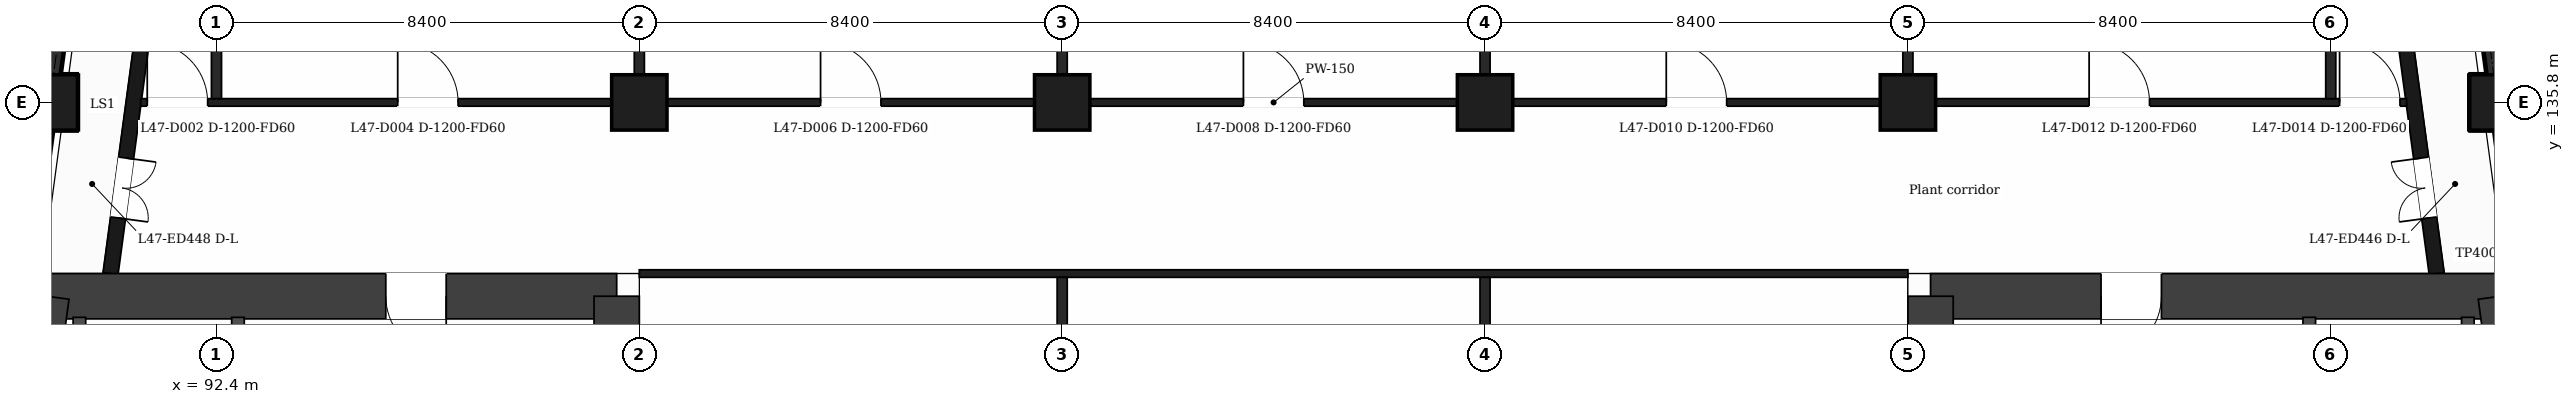
"""IFC4 building model, lengths in metres.
Left out: names, types, materials, properties, quantities, classifications, styles, units other than length and angle.
Written with IfcOpenShell. Run it as: python <this file> out.ifc"""

import sys

from ifc_helpers import new_model, si_unit, direction, frame, frame_2d, origin, origin_2d, place, context, subcontext, project, spatial, rectangle, extrude, element, fill, save


model = new_model("IFC4")
c1 = context("Model", 3, precision=1e-05, world=origin(), true_north=direction((0.0, 1.0)))
c2 = subcontext(c1, "Body", "Model", "MODEL_VIEW")
j1 = project(units=[si_unit("LENGTHUNIT", "METRE"), si_unit("PLANEANGLEUNIT", "RADIAN")], contexts=[c1])
p1 = place(None, origin())
s1 = spatial("IfcSite", under=j1, at=p1, CompositionType="ELEMENT")
p2 = place(p1, origin())
s2 = spatial("IfcBuilding", under=s1, at=p2, CompositionType="ELEMENT")
p3 = place(p2, frame((0.0, 0.0, 197.2)))
s3 = spatial("IfcBuildingStorey", under=s2, at=p3, CompositionType="ELEMENT", Elevation=197.2)
p4 = place(p3, frame((89.024, 131.95, 0.0), z_axis=(0.0, 0.0, 1.0), x_axis=(1.0, 0.0, 0.0)))
e1 = element("IfcWall", 1, at=p4, inside=s3, PredefinedType="SHEAR", context=c2, shape_type="SweptSolid", body=[
    extrude(rectangle(XDim=11.326, YDim=0.9, at=frame_2d((5.663, 0.0))), origin(), (0.0, 0.0, 1.0), 5.0),
])
p5 = place(p4, frame((6.739, 0.0, 0.0)))
e2 = element("IfcOpeningElement", 2, at=p5, cuts=e1, PredefinedType="OPENING", context=c2, shape_type="SweptSolid", body=[
    extrude(rectangle(XDim=1.2, YDim=2.1, at=frame_2d((0.6, 1.05))), frame((0.0, 0.46, 0.0), z_axis=(0.0, -1.0, 0.0), x_axis=(1.0, 0.0, 0.0)), (0.0, 0.0, 1.0), 0.92),
])
p6 = place(p3, frame((100.35, 131.95, 0.0), z_axis=(0.0, 0.0, 1.0), x_axis=(0.0, -1.0, 0.0)))
e3 = element("IfcWall", 3, at=p6, inside=s3, PredefinedType="SHEAR", context=c2, shape_type="SweptSolid", body=[
    extrude(rectangle(XDim=21.1, YDim=0.9, at=frame_2d((10.55, 0.0))), origin(), (0.0, 0.0, 1.0), 5.0),
])
p7 = place(p6, frame((2.35, 0.0, 0.0)))
e4 = element("IfcOpeningElement", 4, at=p7, cuts=e3, PredefinedType="OPENING", context=c2, shape_type="SweptSolid", body=[
    extrude(rectangle(XDim=1.2, YDim=2.1, at=frame_2d((0.6, 1.05))), frame((0.0, 0.46, 0.0), z_axis=(0.0, -1.0, 0.0), x_axis=(1.0, 0.0, 0.0)), (0.0, 0.0, 1.0), 0.92),
])
p8 = place(p6, frame((7.8, 0.0, 0.0)))
e5 = element("IfcOpeningElement", 5, at=p8, cuts=e3, PredefinedType="OPENING", context=c2, shape_type="SweptSolid", body=[
    extrude(rectangle(XDim=1.4, YDim=2.1, at=frame_2d((0.7, 1.05))), frame((0.0, 0.46, 0.0), z_axis=(0.0, -1.0, 0.0), x_axis=(1.0, 0.0, 0.0)), (0.0, 0.0, 1.0), 0.92),
])
p9 = place(p3, frame((86.184, 110.85, 0.0), z_axis=(0.0, 0.0, 1.0), x_axis=(0.133410495943, 0.991060865725, 0.0)))
e6 = element("IfcWall", 6, at=p9, inside=s3, PredefinedType="SHEAR", context=c2, shape_type="SweptSolid", body=[
    extrude(rectangle(XDim=21.29, YDim=0.9, at=frame_2d((10.645, 0.0))), origin(), (0.0, 0.0, 1.0), 5.0),
])
p10 = place(p3, frame((126.45, 131.95, 0.0), z_axis=(0.0, 0.0, 1.0), x_axis=(1.0, 0.0, 0.0)))
e7 = element("IfcWall", 7, at=p10, inside=s3, PredefinedType="SHEAR", context=c2, shape_type="SweptSolid", body=[
    extrude(rectangle(XDim=11.326, YDim=0.9, at=frame_2d((5.663, 0.0))), origin(), (0.0, 0.0, 1.0), 5.0),
])
p11 = place(p10, frame((3.386, 0.0, 0.0)))
e8 = element("IfcOpeningElement", 8, at=p11, cuts=e7, PredefinedType="OPENING", context=c2, shape_type="SweptSolid", body=[
    extrude(rectangle(XDim=1.2, YDim=2.1, at=frame_2d((0.6, 1.05))), frame((0.0, 0.46, 0.0), z_axis=(0.0, -1.0, 0.0), x_axis=(1.0, 0.0, 0.0)), (0.0, 0.0, 1.0), 0.92),
])
p12 = place(p3, frame((137.776, 131.95, 0.0), z_axis=(0.0, 0.0, 1.0), x_axis=(0.133421759112, -0.991059349482, 0.0)))
e9 = element("IfcWall", 9, at=p12, inside=s3, PredefinedType="SHEAR", context=c2, shape_type="SweptSolid", body=[
    extrude(rectangle(XDim=21.29, YDim=0.9, at=frame_2d((10.645, 0.0))), origin(), (0.0, 0.0, 1.0), 5.0),
])
p13 = place(p3, frame((126.45, 110.85, 0.0), z_axis=(0.0, 0.0, 1.0), x_axis=(0.0, 1.0, 0.0)))
e10 = element("IfcWall", 10, at=p13, inside=s3, PredefinedType="SHEAR", context=c2, shape_type="SweptSolid", body=[
    extrude(rectangle(XDim=21.1, YDim=0.9, at=frame_2d((10.55, 0.0))), origin(), (0.0, 0.0, 1.0), 5.0),
])
p14 = place(p13, frame((1.05, 0.0, 0.0)))
e11 = element("IfcOpeningElement", 11, at=p14, cuts=e10, PredefinedType="OPENING", context=c2, shape_type="SweptSolid", body=[
    extrude(rectangle(XDim=1.2, YDim=2.1, at=frame_2d((0.6, 1.05))), frame((0.0, 0.46, 0.0), z_axis=(0.0, -1.0, 0.0), x_axis=(1.0, 0.0, 0.0)), (0.0, 0.0, 1.0), 0.92),
])
p15 = place(p13, frame((11.9, 0.0, 0.0)))
e12 = element("IfcOpeningElement", 12, at=p15, cuts=e10, PredefinedType="OPENING", context=c2, shape_type="SweptSolid", body=[
    extrude(rectangle(XDim=1.4, YDim=2.1, at=frame_2d((0.7, 1.05))), frame((0.0, 0.46, 0.0), z_axis=(0.0, -1.0, 0.0), x_axis=(1.0, 0.0, 0.0)), (0.0, 0.0, 1.0), 0.92),
])
for number, where, z_axis, x_axis in (
    (13, (100.8, 135.8, 0.0), (0.0, 0.0, 1.0), (1.0, 0.0, 0.0)),
    (14, (109.2, 135.8, 0.0), (0.0, 0.0, 1.0), (1.0, 0.0, 0.0)),
    (15, (117.6, 135.8, 0.0), (0.0, 0.0, 1.0), (1.0, 0.0, 0.0)),
    (16, (126.0, 135.8, 0.0), (0.0, 0.0, 1.0), (1.0, 0.0, 0.0)),
    (17, (89.088, 135.8, 0.0), (0.0, 0.0, 1.0), (1.0, 0.0, 0.0)),
    (18, (137.711, 135.8, 0.0), (0.0, 0.0, 1.0), (1.0, 0.0, 0.0)),
):
    element("IfcColumn", number, at=place(p3, frame(where, z_axis=z_axis, x_axis=x_axis)), inside=s3, PredefinedType="COLUMN", context=c2, shape_type="SweptSolid", body=[
        extrude(rectangle(XDim=1.1, YDim=1.1, at=origin_2d()), origin(), (0.0, 0.0, 1.0), 5.0),
    ])
p16 = place(p3, frame((136.504, 132.4, 0.0), z_axis=(0.0, 0.0, 1.0), x_axis=(-0.133399697462, 0.99106231929, 0.0)))
e19 = element("IfcWall", 19, at=p16, inside=s3, PredefinedType="SOLIDWALL", context=c2, shape_type="SweptSolid", body=[
    extrude(rectangle(XDim=6.74, YDim=0.3, at=frame_2d((3.37, 0.0))), origin(), (0.0, 0.0, 1.0), 4.68),
])
p17 = place(p16, frame((1.115, 0.0, 0.0)))
e20 = element("IfcOpeningElement", 20, at=p17, cuts=e19, PredefinedType="OPENING", context=c2, shape_type="SweptSolid", body=[
    extrude(rectangle(XDim=1.2, YDim=2.4, at=frame_2d((0.6, 1.2))), frame((0.0, 0.16, 0.0), z_axis=(0.0, -1.0, 0.0), x_axis=(1.0, 0.0, 0.0)), (0.0, 0.0, 1.0), 0.32),
])
p18 = place(p3, frame((91.177, 138.95, 0.0), z_axis=(0.0, 0.0, 1.0), x_axis=(-0.133426664613, -0.991058689065, 0.0)))
e21 = element("IfcWall", 21, at=p18, inside=s3, PredefinedType="SOLIDWALL", context=c2, shape_type="SweptSolid", body=[
    extrude(rectangle(XDim=6.609, YDim=0.3, at=frame_2d((3.305, 0.0))), origin(), (0.0, 0.0, 1.0), 4.68),
])
p19 = place(p18, frame((4.294, 0.0, 0.0)))
e22 = element("IfcOpeningElement", 22, at=p19, cuts=e21, PredefinedType="OPENING", context=c2, shape_type="SweptSolid", body=[
    extrude(rectangle(XDim=1.2, YDim=2.4, at=frame_2d((0.6, 1.2))), frame((0.0, 0.16, 0.0), z_axis=(0.0, -1.0, 0.0), x_axis=(1.0, 0.0, 0.0)), (0.0, 0.0, 1.0), 0.32),
])
p20 = place(p3, frame((100.8, 132.4, 0.0), z_axis=(0.0, 0.0, 1.0), x_axis=(1.0, 0.0, 0.0)))
e23 = element("IfcWall", 23, at=p20, inside=s3, PredefinedType="PARTITIONING", context=c2, shape_type="SweptSolid", body=[
    extrude(rectangle(XDim=25.2, YDim=0.15, at=frame_2d((12.6, 0.0))), origin(), (0.0, 0.0, 1.0), 4.68),
])
p21 = place(p3, frame((90.895, 135.8, 0.0), z_axis=(0.0, 0.0, 1.0), x_axis=(1.0, 0.0, 0.0)))
e24 = element("IfcWall", 24, at=p21, inside=s3, PredefinedType="PARTITIONING", context=c2, shape_type="SweptSolid", body=[
    extrude(rectangle(XDim=45.011, YDim=0.15, at=frame_2d((22.505, 0.0))), origin(), (0.0, 0.0, 1.0), 4.68),
])
p22 = place(p21, frame((0.13, 0.0, 0.0)))
e25 = element("IfcOpeningElement", 25, at=p22, cuts=e24, PredefinedType="OPENING", context=c2, shape_type="SweptSolid", body=[
    extrude(rectangle(XDim=1.2, YDim=2.1, at=frame_2d((0.6, 1.05))), frame((0.0, 0.085, 0.0), z_axis=(0.0, -1.0, 0.0), x_axis=(1.0, 0.0, 0.0)), (0.0, 0.0, 1.0), 0.17),
])
p23 = place(p21, frame((5.105, 0.0, 0.0)))
e26 = element("IfcOpeningElement", 26, at=p23, cuts=e24, PredefinedType="OPENING", context=c2, shape_type="SweptSolid", body=[
    extrude(rectangle(XDim=1.2, YDim=2.1, at=frame_2d((0.6, 1.05))), frame((0.0, 0.085, 0.0), z_axis=(0.0, -1.0, 0.0), x_axis=(1.0, 0.0, 0.0)), (0.0, 0.0, 1.0), 0.17),
])
p24 = place(p21, frame((13.505, 0.0, 0.0)))
e27 = element("IfcOpeningElement", 27, at=p24, cuts=e24, PredefinedType="OPENING", context=c2, shape_type="SweptSolid", body=[
    extrude(rectangle(XDim=1.2, YDim=2.1, at=frame_2d((0.6, 1.05))), frame((0.0, 0.085, 0.0), z_axis=(0.0, -1.0, 0.0), x_axis=(1.0, 0.0, 0.0)), (0.0, 0.0, 1.0), 0.17),
])
p25 = place(p21, frame((21.906, 0.0, 0.0)))
e28 = element("IfcOpeningElement", 28, at=p25, cuts=e24, PredefinedType="OPENING", context=c2, shape_type="SweptSolid", body=[
    extrude(rectangle(XDim=1.2, YDim=2.1, at=frame_2d((0.6, 1.05))), frame((0.0, 0.085, 0.0), z_axis=(0.0, -1.0, 0.0), x_axis=(1.0, 0.0, 0.0)), (0.0, 0.0, 1.0), 0.17),
])
p26 = place(p21, frame((30.305, 0.0, 0.0)))
e29 = element("IfcOpeningElement", 29, at=p26, cuts=e24, PredefinedType="OPENING", context=c2, shape_type="SweptSolid", body=[
    extrude(rectangle(XDim=1.2, YDim=2.1, at=frame_2d((0.6, 1.05))), frame((0.0, 0.085, 0.0), z_axis=(0.0, -1.0, 0.0), x_axis=(1.0, 0.0, 0.0)), (0.0, 0.0, 1.0), 0.17),
])
p27 = place(p21, frame((38.705, 0.0, 0.0)))
e30 = element("IfcOpeningElement", 30, at=p27, cuts=e24, PredefinedType="OPENING", context=c2, shape_type="SweptSolid", body=[
    extrude(rectangle(XDim=1.2, YDim=2.1, at=frame_2d((0.6, 1.05))), frame((0.0, 0.085, 0.0), z_axis=(0.0, -1.0, 0.0), x_axis=(1.0, 0.0, 0.0)), (0.0, 0.0, 1.0), 0.17),
])
p28 = place(p21, frame((43.681, 0.0, 0.0)))
e31 = element("IfcOpeningElement", 31, at=p28, cuts=e24, PredefinedType="OPENING", context=c2, shape_type="SweptSolid", body=[
    extrude(rectangle(XDim=1.2, YDim=2.1, at=frame_2d((0.6, 1.05))), frame((0.0, 0.085, 0.0), z_axis=(0.0, -1.0, 0.0), x_axis=(1.0, 0.0, 0.0)), (0.0, 0.0, 1.0), 0.17),
])
p29 = place(p3, frame((89.677, 124.575, 0.0), z_axis=(0.0, 0.0, 1.0), x_axis=(0.0, 1.0, 0.0)))
e32 = element("IfcWall", 32, at=p29, inside=s3, PredefinedType="PARTITIONING", context=c2, shape_type="SweptSolid", body=[
    extrude(rectangle(XDim=6.955, YDim=0.25, at=frame_2d((3.478, 0.0))), origin(), (0.0, 0.0, 1.0), 4.68),
])
p30 = place(p3, frame((92.4, 135.875, 0.0), z_axis=(0.0, 0.0, 1.0), x_axis=(0.0, 1.0, 0.0)))
e33 = element("IfcWall", 33, at=p30, inside=s3, PredefinedType="PARTITIONING", context=c2, shape_type="SweptSolid", body=[
    extrude(rectangle(XDim=2.935, YDim=0.2, at=frame_2d((1.468, 0.0))), origin(), (0.0, 0.0, 1.0), 4.68),
])
p31 = place(p3, frame((92.827, 124.575, 0.0), z_axis=(0.0, 0.0, 1.0), x_axis=(0.0, 1.0, 0.0)))
e34 = element("IfcWall", 34, at=p31, inside=s3, PredefinedType="PARTITIONING", context=c2, shape_type="SweptSolid", body=[
    extrude(rectangle(XDim=6.955, YDim=0.25, at=frame_2d((3.478, 0.0))), origin(), (0.0, 0.0, 1.0), 4.68),
])
p32 = place(p31, frame((5.325, 0.0, 0.0)))
e35 = element("IfcOpeningElement", 35, at=p32, cuts=e34, PredefinedType="OPENING", context=c2, shape_type="SweptSolid", body=[
    extrude(rectangle(XDim=1.0, YDim=2.1, at=frame_2d((0.5, 1.05))), frame((0.0, 0.135, 0.0), z_axis=(0.0, -1.0, 0.0), x_axis=(1.0, 0.0, 0.0)), (0.0, 0.0, 1.0), 0.27),
])
p33 = place(p3, frame((100.8, 135.875, 0.0), z_axis=(0.0, 0.0, 1.0), x_axis=(0.0, 1.0, 0.0)))
e36 = element("IfcWall", 36, at=p33, inside=s3, PredefinedType="PARTITIONING", context=c2, shape_type="SweptSolid", body=[
    extrude(rectangle(XDim=7.135, YDim=0.2, at=frame_2d((3.567, 0.0))), origin(), (0.0, 0.0, 1.0), 4.68),
])
p34 = place(p3, frame((109.2, 124.875, 0.0), z_axis=(0.0, 0.0, 1.0), x_axis=(0.0, 1.0, 0.0)))
e37 = element("IfcWall", 37, at=p34, inside=s3, PredefinedType="PARTITIONING", context=c2, shape_type="SweptSolid", body=[
    extrude(rectangle(XDim=7.45, YDim=0.2, at=frame_2d((3.725, 0.0))), origin(), (0.0, 0.0, 1.0), 4.68),
])
p35 = place(p3, frame((109.2, 135.875, 0.0), z_axis=(0.0, 0.0, 1.0), x_axis=(0.0, 1.0, 0.0)))
e38 = element("IfcWall", 38, at=p35, inside=s3, PredefinedType="PARTITIONING", context=c2, shape_type="SweptSolid", body=[
    extrude(rectangle(XDim=7.135, YDim=0.2, at=frame_2d((3.567, 0.0))), origin(), (0.0, 0.0, 1.0), 4.68),
])
p36 = place(p3, frame((117.6, 124.875, 0.0), z_axis=(0.0, 0.0, 1.0), x_axis=(0.0, 1.0, 0.0)))
e39 = element("IfcWall", 39, at=p36, inside=s3, PredefinedType="PARTITIONING", context=c2, shape_type="SweptSolid", body=[
    extrude(rectangle(XDim=7.45, YDim=0.2, at=frame_2d((3.725, 0.0))), origin(), (0.0, 0.0, 1.0), 4.68),
])
for number, where, z_axis, x_axis in (
    (40, (117.6, 135.875, 0.0), (0.0, 0.0, 1.0), (0.0, 1.0, 0.0)),
    (41, (126.0, 135.875, 0.0), (0.0, 0.0, 1.0), (0.0, 1.0, 0.0)),
):
    element("IfcWall", number, at=place(p3, frame(where, z_axis=z_axis, x_axis=x_axis)), inside=s3, PredefinedType="PARTITIONING", context=c2, shape_type="SweptSolid", body=[
        extrude(rectangle(XDim=7.135, YDim=0.2, at=frame_2d((3.567, 0.0))), origin(), (0.0, 0.0, 1.0), 4.68),
    ])
p37 = place(p3, frame((133.973, 124.575, 0.0), z_axis=(0.0, 0.0, 1.0), x_axis=(0.0, 1.0, 0.0)))
e42 = element("IfcWall", 42, at=p37, inside=s3, PredefinedType="PARTITIONING", context=c2, shape_type="SweptSolid", body=[
    extrude(rectangle(XDim=6.955, YDim=0.25, at=frame_2d((3.478, 0.0))), origin(), (0.0, 0.0, 1.0), 4.68),
])
p38 = place(p37, frame((5.325, 0.0, 0.0)))
e43 = element("IfcOpeningElement", 43, at=p38, cuts=e42, PredefinedType="OPENING", context=c2, shape_type="SweptSolid", body=[
    extrude(rectangle(XDim=1.0, YDim=2.1, at=frame_2d((0.5, 1.05))), frame((0.0, 0.135, 0.0), z_axis=(0.0, -1.0, 0.0), x_axis=(1.0, 0.0, 0.0)), (0.0, 0.0, 1.0), 0.27),
])
p39 = place(p3, frame((134.4, 135.875, 0.0), z_axis=(0.0, 0.0, 1.0), x_axis=(0.0, 1.0, 0.0)))
e44 = element("IfcWall", 44, at=p39, inside=s3, PredefinedType="PARTITIONING", context=c2, shape_type="SweptSolid", body=[
    extrude(rectangle(XDim=2.935, YDim=0.2, at=frame_2d((1.468, 0.0))), origin(), (0.0, 0.0, 1.0), 4.68),
])
p40 = place(p3, frame((137.123, 124.575, 0.0), z_axis=(0.0, 0.0, 1.0), x_axis=(0.0, 1.0, 0.0)))
e45 = element("IfcWall", 45, at=p40, inside=s3, PredefinedType="PARTITIONING", context=c2, shape_type="SweptSolid", body=[
    extrude(rectangle(XDim=6.955, YDim=0.25, at=frame_2d((3.478, 0.0))), origin(), (0.0, 0.0, 1.0), 4.68),
])
p41 = place(p17, origin())
e46 = element("IfcDoor", 46, at=p41, inside=s3, OperationType="DOUBLE_DOOR_SINGLE_SWING", PredefinedType="DOOR", context=c2, shape_type="SweptSolid", body=[
    extrude(rectangle(XDim=1.2, YDim=2.4, at=frame_2d((0.6, 1.2))), frame((0.0, 0.025, 0.0), z_axis=(0.0, -1.0, 0.0), x_axis=(1.0, 0.0, 0.0)), (0.0, 0.0, 1.0), 0.05),
])
fill(e20, e46)
p42 = place(p19, origin())
e47 = element("IfcDoor", 47, at=p42, inside=s3, OperationType="DOUBLE_DOOR_SINGLE_SWING", PredefinedType="DOOR", context=c2, shape_type="SweptSolid", body=[
    extrude(rectangle(XDim=1.2, YDim=2.4, at=frame_2d((0.6, 1.2))), frame((0.0, 0.025, 0.0), z_axis=(0.0, -1.0, 0.0), x_axis=(1.0, 0.0, 0.0)), (0.0, 0.0, 1.0), 0.05),
])
fill(e22, e47)
p43 = place(p22, origin())
e48 = element("IfcDoor", 48, at=p43, inside=s3, OperationType="SINGLE_SWING_LEFT", PredefinedType="DOOR", context=c2, shape_type="SweptSolid", body=[
    extrude(rectangle(XDim=1.2, YDim=2.1, at=frame_2d((0.6, 1.05))), frame((0.0, 0.025, 0.0), z_axis=(0.0, -1.0, 0.0), x_axis=(1.0, 0.0, 0.0)), (0.0, 0.0, 1.0), 0.05),
])
fill(e25, e48)
p44 = place(p23, origin())
e49 = element("IfcDoor", 49, at=p44, inside=s3, OperationType="SINGLE_SWING_LEFT", PredefinedType="DOOR", context=c2, shape_type="SweptSolid", body=[
    extrude(rectangle(XDim=1.2, YDim=2.1, at=frame_2d((0.6, 1.05))), frame((0.0, 0.025, 0.0), z_axis=(0.0, -1.0, 0.0), x_axis=(1.0, 0.0, 0.0)), (0.0, 0.0, 1.0), 0.05),
])
fill(e26, e49)
p45 = place(p24, origin())
e50 = element("IfcDoor", 50, at=p45, inside=s3, OperationType="SINGLE_SWING_LEFT", PredefinedType="DOOR", context=c2, shape_type="SweptSolid", body=[
    extrude(rectangle(XDim=1.2, YDim=2.1, at=frame_2d((0.6, 1.05))), frame((0.0, 0.025, 0.0), z_axis=(0.0, -1.0, 0.0), x_axis=(1.0, 0.0, 0.0)), (0.0, 0.0, 1.0), 0.05),
])
fill(e27, e50)
p46 = place(p25, origin())
e51 = element("IfcDoor", 51, at=p46, inside=s3, OperationType="SINGLE_SWING_LEFT", PredefinedType="DOOR", context=c2, shape_type="SweptSolid", body=[
    extrude(rectangle(XDim=1.2, YDim=2.1, at=frame_2d((0.6, 1.05))), frame((0.0, 0.025, 0.0), z_axis=(0.0, -1.0, 0.0), x_axis=(1.0, 0.0, 0.0)), (0.0, 0.0, 1.0), 0.05),
])
fill(e28, e51)
p47 = place(p26, origin())
e52 = element("IfcDoor", 52, at=p47, inside=s3, OperationType="SINGLE_SWING_LEFT", PredefinedType="DOOR", context=c2, shape_type="SweptSolid", body=[
    extrude(rectangle(XDim=1.2, YDim=2.1, at=frame_2d((0.6, 1.05))), frame((0.0, 0.025, 0.0), z_axis=(0.0, -1.0, 0.0), x_axis=(1.0, 0.0, 0.0)), (0.0, 0.0, 1.0), 0.05),
])
fill(e29, e52)
p48 = place(p27, origin())
e53 = element("IfcDoor", 53, at=p48, inside=s3, OperationType="SINGLE_SWING_LEFT", PredefinedType="DOOR", context=c2, shape_type="SweptSolid", body=[
    extrude(rectangle(XDim=1.2, YDim=2.1, at=frame_2d((0.6, 1.05))), frame((0.0, 0.025, 0.0), z_axis=(0.0, -1.0, 0.0), x_axis=(1.0, 0.0, 0.0)), (0.0, 0.0, 1.0), 0.05),
])
fill(e30, e53)
p49 = place(p28, origin())
e54 = element("IfcDoor", 54, at=p49, inside=s3, OperationType="SINGLE_SWING_LEFT", PredefinedType="DOOR", context=c2, shape_type="SweptSolid", body=[
    extrude(rectangle(XDim=1.2, YDim=2.1, at=frame_2d((0.6, 1.05))), frame((0.0, 0.025, 0.0), z_axis=(0.0, -1.0, 0.0), x_axis=(1.0, 0.0, 0.0)), (0.0, 0.0, 1.0), 0.05),
])
fill(e31, e54)
p50 = place(p5, origin())
e55 = element("IfcDoor", 55, at=p50, inside=s3, OperationType="SINGLE_SWING_RIGHT", PredefinedType="DOOR", context=c2, shape_type="SweptSolid", body=[
    extrude(rectangle(XDim=1.2, YDim=2.1, at=frame_2d((0.6, 1.05))), frame((0.0, 0.025, 0.0), z_axis=(0.0, -1.0, 0.0), x_axis=(1.0, 0.0, 0.0)), (0.0, 0.0, 1.0), 0.05),
])
fill(e2, e55)
p51 = place(p11, origin())
e56 = element("IfcDoor", 56, at=p51, inside=s3, OperationType="SINGLE_SWING_LEFT", PredefinedType="DOOR", context=c2, shape_type="SweptSolid", body=[
    extrude(rectangle(XDim=1.2, YDim=2.1, at=frame_2d((0.6, 1.05))), frame((0.0, 0.025, 0.0), z_axis=(0.0, -1.0, 0.0), x_axis=(1.0, 0.0, 0.0)), (0.0, 0.0, 1.0), 0.05),
])
fill(e8, e56)
save(model, sys.argv[1])
